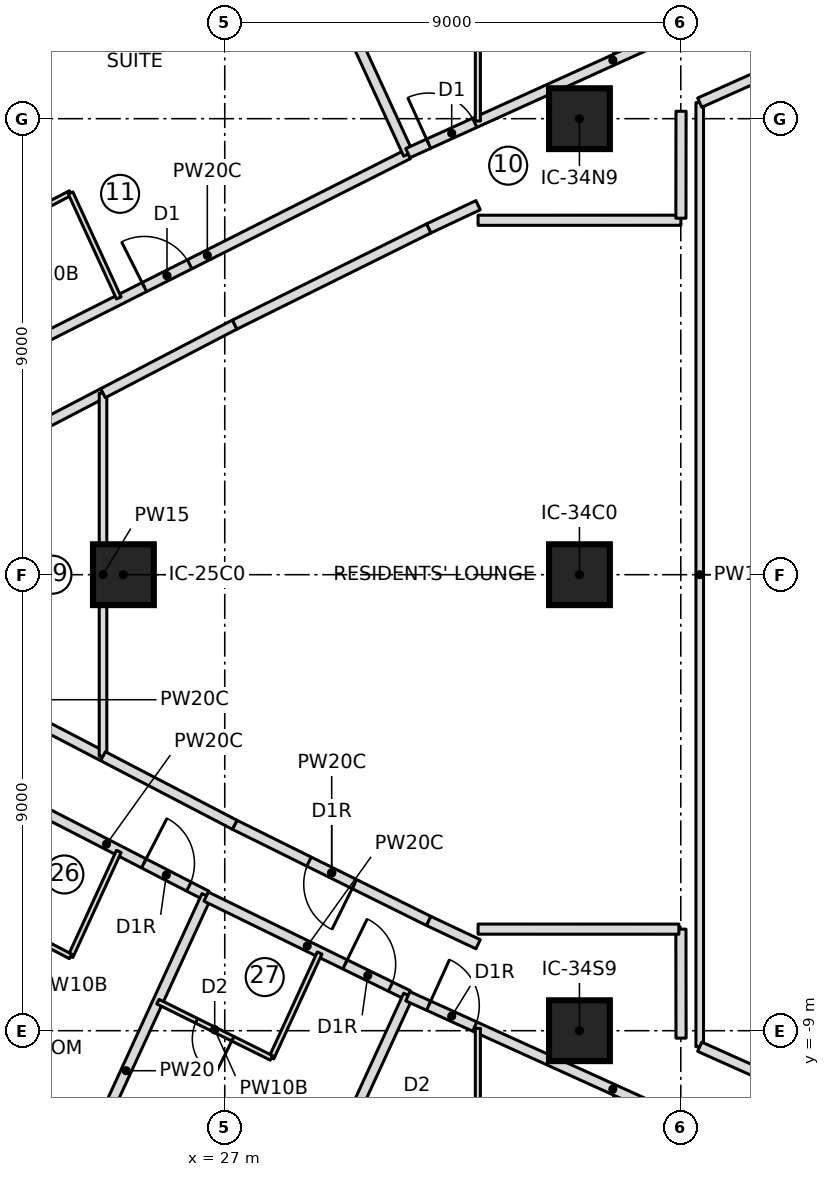
"""IFC4 building model, lengths in metres.
Left out: names, types, materials, properties, quantities, classifications, styles, units other than length and angle.
Written with IfcOpenShell. Run it as: python <this file> out.ifc"""

import sys

from ifc_helpers import new_model, si_unit, direction, frame, frame_2d, origin, origin_2d, place, context, subcontext, project, spatial, rectangle, extrude, element, fill, save


model = new_model("IFC4")
c1 = context("Model", 3, precision=1e-05, world=origin(), true_north=direction((0.0, 1.0)))
c2 = subcontext(c1, "Body", "Model", "MODEL_VIEW")
j1 = project(units=[si_unit("LENGTHUNIT", "METRE"), si_unit("PLANEANGLEUNIT", "RADIAN")], contexts=[c1])
p1 = place(None, origin())
s1 = spatial("IfcSite", under=j1, at=p1, CompositionType="ELEMENT")
p2 = place(p1, origin())
s2 = spatial("IfcBuilding", under=s1, at=p2, CompositionType="ELEMENT")
p3 = place(p2, frame((0.0, 0.0, 95.55)))
s3 = spatial("IfcBuildingStorey", under=s2, at=p3, CompositionType="ELEMENT", Elevation=95.55)
for number, where, z_axis, x_axis in (
    (1, (25.0, 0.0, 0.0), (0.0, 0.0, 1.0), (1.0, 0.0, 0.0)),
    (2, (34.0, -9.0, 0.0), (0.0, 0.0, 1.0), (1.0, 0.0, 0.0)),
    (3, (34.0, 0.0, 0.0), (0.0, 0.0, 1.0), (1.0, 0.0, 0.0)),
    (4, (34.0, 9.0, 0.0), (0.0, 0.0, 1.0), (1.0, 0.0, 0.0)),
):
    element("IfcColumn", number, at=place(p3, frame(where, z_axis=z_axis, x_axis=x_axis)), inside=s3, PredefinedType="COLUMN", context=c2, shape_type="SweptSolid", body=[
        extrude(rectangle(XDim=1.2, YDim=1.2, at=origin_2d()), origin(), (0.0, 0.0, 1.0), 3.55),
    ])
p4 = place(p3, frame((22.69, 4.302, 0.0), z_axis=(0.0, 0.0, 1.0), x_axis=(0.892904919467, 0.450245271815, 0.0)))
e5 = element("IfcWall", 5, at=p4, inside=s3, PredefinedType="PARTITIONING", context=c2, shape_type="SweptSolid", body=[
    extrude(rectangle(XDim=8.883, YDim=0.2, at=frame_2d((4.441, 0.0))), origin(), (0.0, 0.0, 1.0), 3.25),
])
p5 = place(p4, frame((3.05, 0.0, 0.0)))
e6 = element("IfcOpeningElement", 6, at=p5, cuts=e5, PredefinedType="OPENING", context=c2, shape_type="SweptSolid", body=[
    extrude(rectangle(XDim=1.0, YDim=2.1, at=frame_2d((0.5, 1.05))), frame((0.0, 0.11, 0.0), z_axis=(0.0, -1.0, 0.0), x_axis=(1.0, 0.0, 0.0)), (0.0, 0.0, 1.0), 0.22),
])
p6 = place(p3, frame((21.738, 6.377, 0.0), z_axis=(0.0, 0.0, 1.0), x_axis=(0.886911586599, 0.461939214135, 0.0)))
e7 = element("IfcWall", 7, at=p6, inside=s3, PredefinedType="PARTITIONING", context=c2, shape_type="SweptSolid", body=[
    extrude(rectangle(XDim=2.503, YDim=0.1, at=frame_2d((1.251, 0.0))), origin(), (0.0, 0.0, 1.0), 3.25),
])
p7 = place(p6, frame((0.85, 0.0, 0.0)))
e8 = element("IfcOpeningElement", 8, at=p7, cuts=e7, PredefinedType="OPENING", context=c2, shape_type="SweptSolid", body=[
    extrude(rectangle(XDim=0.8, YDim=2.1, at=frame_2d((0.4, 1.05))), frame((0.0, 0.06, 0.0), z_axis=(0.0, -1.0, 0.0), x_axis=(1.0, 0.0, 0.0)), (0.0, 0.0, 1.0), 0.12),
])
p8 = place(p3, frame((23.958, 7.533, 0.0), z_axis=(0.0, 0.0, 1.0), x_axis=(0.417454762401, -0.908697706253, 0.0)))
e9 = element("IfcWall", 9, at=p8, inside=s3, PredefinedType="PARTITIONING", context=c2, shape_type="SweptSolid", body=[
    extrude(rectangle(XDim=2.28, YDim=0.1, at=frame_2d((1.14, 0.0))), origin(), (0.0, 0.0, 1.0), 3.25),
])
p9 = place(p3, frame((30.622, 8.302, 0.0), z_axis=(0.0, 0.0, 1.0), x_axis=(-0.417429919618, 0.90870911859, 0.0)))
e10 = element("IfcWall", 10, at=p9, inside=s3, PredefinedType="PARTITIONING", context=c2, shape_type="SweptSolid", body=[
    extrude(rectangle(XDim=7.6, YDim=0.2, at=frame_2d((3.8, 0.0))), origin(), (0.0, 0.0, 1.0), 3.25),
])
p10 = place(p3, frame((30.614, 8.32, 0.0), z_axis=(0.0, 0.0, 1.0), x_axis=(0.910751030363, 0.41295588226, 0.0)))
e11 = element("IfcWall", 11, at=p10, inside=s3, PredefinedType="PARTITIONING", context=c2, shape_type="SweptSolid", body=[
    extrude(rectangle(XDim=8.883, YDim=0.2, at=frame_2d((4.442, 0.0))), origin(), (0.0, 0.0, 1.0), 3.25),
])
p11 = place(p10, frame((0.45, 0.0, 0.0)))
e12 = element("IfcOpeningElement", 12, at=p11, cuts=e11, PredefinedType="OPENING", context=c2, shape_type="SweptSolid", body=[
    extrude(rectangle(XDim=1.0, YDim=2.1, at=frame_2d((0.5, 1.05))), frame((0.0, 0.11, 0.0), z_axis=(0.0, -1.0, 0.0), x_axis=(1.0, 0.0, 0.0)), (0.0, 0.0, 1.0), 0.22),
])
p12 = place(p3, frame((22.69, -4.302, 0.0), z_axis=(0.0, 0.0, 1.0), x_axis=(0.889236075961, -0.457448577667, 0.0)))
e13 = element("IfcWall", 13, at=p12, inside=s3, PredefinedType="PARTITIONING", context=c2, shape_type="SweptSolid", body=[
    extrude(rectangle(XDim=4.443, YDim=0.2, at=frame_2d((2.222, 0.0))), origin(), (0.0, 0.0, 1.0), 3.25),
])
p13 = place(p12, frame((3.05, 0.0, 0.0)))
e14 = element("IfcOpeningElement", 14, at=p13, cuts=e13, PredefinedType="OPENING", context=c2, shape_type="SweptSolid", body=[
    extrude(rectangle(XDim=1.0, YDim=2.1, at=frame_2d((0.5, 1.05))), frame((0.0, 0.11, 0.0), z_axis=(0.0, -1.0, 0.0), x_axis=(1.0, 0.0, 0.0)), (0.0, 0.0, 1.0), 0.22),
])
p14 = place(p3, frame((24.909, -5.462, 0.0), z_axis=(0.0, 0.0, 1.0), x_axis=(-0.417454762401, -0.908697706253, 0.0)))
e15 = element("IfcWall", 15, at=p14, inside=s3, PredefinedType="PARTITIONING", context=c2, shape_type="SweptSolid", body=[
    extrude(rectangle(XDim=2.28, YDim=0.1, at=frame_2d((1.14, 0.0))), origin(), (0.0, 0.0, 1.0), 3.25),
])
p15 = place(p3, frame((23.958, -7.533, 0.0), z_axis=(0.0, 0.0, 1.0), x_axis=(-0.886911586599, 0.461939214135, 0.0)))
e16 = element("IfcWall", 16, at=p15, inside=s3, PredefinedType="PARTITIONING", context=c2, shape_type="SweptSolid", body=[
    extrude(rectangle(XDim=2.503, YDim=0.1, at=frame_2d((1.251, 0.0))), origin(), (0.0, 0.0, 1.0), 3.25),
])
p16 = place(p15, frame((0.85, 0.0, 0.0)))
e17 = element("IfcOpeningElement", 17, at=p16, cuts=e16, PredefinedType="OPENING", context=c2, shape_type="SweptSolid", body=[
    extrude(rectangle(XDim=0.8, YDim=2.1, at=frame_2d((0.4, 1.05))), frame((0.0, 0.06, 0.0), z_axis=(0.0, -1.0, 0.0), x_axis=(1.0, 0.0, 0.0)), (0.0, 0.0, 1.0), 0.12),
])
p17 = place(p3, frame((23.467, -13.244, 0.0), z_axis=(0.0, 0.0, 1.0), x_axis=(0.417455028008, 0.908697584233, 0.0)))
e18 = element("IfcWall", 18, at=p17, inside=s3, PredefinedType="PARTITIONING", context=c2, shape_type="SweptSolid", body=[
    extrude(rectangle(XDim=7.603, YDim=0.2, at=frame_2d((3.802, 0.0))), origin(), (0.0, 0.0, 1.0), 3.25),
])
p18 = place(p3, frame((26.633, -6.353, 0.0), z_axis=(0.0, 0.0, 1.0), x_axis=(0.898502457097, -0.438968489291, 0.0)))
e19 = element("IfcWall", 19, at=p18, inside=s3, PredefinedType="PARTITIONING", context=c2, shape_type="SweptSolid", body=[
    extrude(rectangle(XDim=4.44, YDim=0.2, at=frame_2d((2.22, 0.0))), origin(), (0.0, 0.0, 1.0), 3.25),
])
p19 = place(p18, frame((3.05, 0.0, 0.0)))
e20 = element("IfcOpeningElement", 20, at=p19, cuts=e19, PredefinedType="OPENING", context=c2, shape_type="SweptSolid", body=[
    extrude(rectangle(XDim=1.0, YDim=2.1, at=frame_2d((0.5, 1.05))), frame((0.0, 0.11, 0.0), z_axis=(0.0, -1.0, 0.0), x_axis=(1.0, 0.0, 0.0)), (0.0, 0.0, 1.0), 0.22),
])
p20 = place(p3, frame((28.873, -7.467, 0.0), z_axis=(0.0, 0.0, 1.0), x_axis=(-0.417433204355, -0.908707609686, 0.0)))
e21 = element("IfcWall", 21, at=p20, inside=s3, PredefinedType="PARTITIONING", context=c2, shape_type="SweptSolid", body=[
    extrude(rectangle(XDim=2.278, YDim=0.1, at=frame_2d((1.139, 0.0))), origin(), (0.0, 0.0, 1.0), 3.25),
])
p21 = place(p3, frame((27.922, -9.537, 0.0), z_axis=(0.0, 0.0, 1.0), x_axis=(-0.895944857815, 0.444165297784, 0.0)))
e22 = element("IfcWall", 22, at=p21, inside=s3, PredefinedType="PARTITIONING", context=c2, shape_type="SweptSolid", body=[
    extrude(rectangle(XDim=2.501, YDim=0.1, at=frame_2d((1.25, 0.0))), origin(), (0.0, 0.0, 1.0), 3.25),
])
p22 = place(p21, frame((0.85, 0.0, 0.0)))
e23 = element("IfcOpeningElement", 23, at=p22, cuts=e22, PredefinedType="OPENING", context=c2, shape_type="SweptSolid", body=[
    extrude(rectangle(XDim=0.8, YDim=2.1, at=frame_2d((0.4, 1.05))), frame((0.0, 0.06, 0.0), z_axis=(0.0, -1.0, 0.0), x_axis=(1.0, 0.0, 0.0)), (0.0, 0.0, 1.0), 0.12),
])
p23 = place(p3, frame((27.449, -15.208, 0.0), z_axis=(0.0, 0.0, 1.0), x_axis=(0.417429919618, 0.90870911859, 0.0)))
e24 = element("IfcWall", 24, at=p23, inside=s3, PredefinedType="PARTITIONING", context=c2, shape_type="SweptSolid", body=[
    extrude(rectangle(XDim=7.6, YDim=0.2, at=frame_2d((3.8, 0.0))), origin(), (0.0, 0.0, 1.0), 3.25),
])
p24 = place(p3, frame((30.614, -8.32, 0.0), z_axis=(0.0, 0.0, 1.0), x_axis=(0.910751030363, -0.41295588226, 0.0)))
e25 = element("IfcWall", 25, at=p24, inside=s3, PredefinedType="PARTITIONING", context=c2, shape_type="SweptSolid", body=[
    extrude(rectangle(XDim=8.883, YDim=0.2, at=frame_2d((4.442, 0.0))), origin(), (0.0, 0.0, 1.0), 3.25),
])
p25 = place(p24, frame((0.45, 0.0, 0.0)))
e26 = element("IfcOpeningElement", 26, at=p25, cuts=e25, PredefinedType="OPENING", context=c2, shape_type="SweptSolid", body=[
    extrude(rectangle(XDim=1.0, YDim=2.1, at=frame_2d((0.5, 1.05))), frame((0.0, 0.11, 0.0), z_axis=(0.0, -1.0, 0.0), x_axis=(1.0, 0.0, 0.0)), (0.0, 0.0, 1.0), 0.22),
])
for number, where, z_axis, x_axis in (
    (27, (23.407, 2.962, 0.0), (0.0, 0.0, 1.0), (0.887, 0.462, 0.0)),
    (28, (24.598, -3.582, 0.0), (0.0, 0.0, 1.0), (-0.887, 0.462, 0.0)),
):
    element("IfcWall", number, at=place(p3, frame(where, z_axis=z_axis, x_axis=x_axis)), inside=s3, PredefinedType="PARTITIONING", context=c2, shape_type="SweptSolid", body=[
        extrude(rectangle(XDim=1.343, YDim=0.2, at=frame_2d((0.671, 0.0))), origin(), (0.0, 0.0, 1.0), 3.25),
    ])
p26 = place(p3, frame((24.598, -3.582, 0.0), z_axis=(0.0, 0.0, 1.0), x_axis=(0.0, 1.0, 0.0)))
e29 = element("IfcWall", 29, at=p26, inside=s3, PredefinedType="PARTITIONING", context=c2, shape_type="SweptSolid", body=[
    extrude(rectangle(XDim=7.165, YDim=0.15, at=frame_2d((3.582, 0.0))), origin(), (0.0, 0.0, 1.0), 3.25),
])
p27 = place(p3, frame((31.025, -6.833, 0.0), z_axis=(0.0, 0.0, 1.0), x_axis=(-0.895975836328, 0.44410280422, 0.0)))
e30 = element("IfcWall", 30, at=p27, inside=s3, PredefinedType="PARTITIONING", context=c2, shape_type="SweptSolid", body=[
    extrude(rectangle(XDim=4.273, YDim=0.2, at=frame_2d((2.137, 0.0))), origin(), (0.0, 0.0, 1.0), 3.25),
])
p28 = place(p27, frame((1.636, 0.0, 0.0)))
e31 = element("IfcOpeningElement", 31, at=p28, cuts=e30, PredefinedType="OPENING", context=c2, shape_type="SweptSolid", body=[
    extrude(rectangle(XDim=1.0, YDim=2.1, at=frame_2d((0.5, 1.05))), frame((0.0, 0.11, 0.0), z_axis=(0.0, -1.0, 0.0), x_axis=(1.0, 0.0, 0.0)), (0.0, 0.0, 1.0), 0.22),
])
for number, where, z_axis, x_axis in (
    (32, (31.025, 6.833, 0.0), (0.0, 0.0, 1.0), (0.905, 0.426, 0.0)),
    (33, (32.0, -7.293, 0.0), (0.0, 0.0, 1.0), (-0.905, 0.426, 0.0)),
):
    element("IfcWall", number, at=place(p3, frame(where, z_axis=z_axis, x_axis=x_axis)), inside=s3, PredefinedType="PARTITIONING", context=c2, shape_type="SweptSolid", body=[
        extrude(rectangle(XDim=1.078, YDim=0.2, at=frame_2d((0.539, 0.0))), origin(), (0.0, 0.0, 1.0), 3.25),
    ])
for number, where, z_axis, x_axis in (
    (34, (27.196, -4.936, 0.0), (0.0, 0.0, 1.0), (-0.887, 0.462, 0.0)),
    (35, (24.598, 3.582, 0.0), (0.0, 0.0, 1.0), (0.887, 0.462, 0.0)),
):
    element("IfcWall", number, at=place(p3, frame(where, z_axis=z_axis, x_axis=x_axis)), inside=s3, PredefinedType="PARTITIONING", context=c2, shape_type="SweptSolid", body=[
        extrude(rectangle(XDim=2.93, YDim=0.2, at=frame_2d((1.465, 0.0))), origin(), (0.0, 0.0, 1.0), 3.25),
    ])
p29 = place(p3, frame((27.196, 4.936, 0.0), z_axis=(0.0, 0.0, 1.0), x_axis=(0.895975836328, 0.44410280422, 0.0)))
e36 = element("IfcWall", 36, at=p29, inside=s3, PredefinedType="PARTITIONING", context=c2, shape_type="SweptSolid", body=[
    extrude(rectangle(XDim=4.273, YDim=0.2, at=frame_2d((2.137, 0.0))), origin(), (0.0, 0.0, 1.0), 3.25),
])
p30 = place(p3, frame((36.374, -9.317, 0.0), z_axis=(0.0, 0.0, 1.0), x_axis=(0.0, 1.0, 0.0)))
e37 = element("IfcWall", 37, at=p30, inside=s3, PredefinedType="PARTITIONING", context=c2, shape_type="SweptSolid", body=[
    extrude(rectangle(XDim=18.634, YDim=0.15, at=frame_2d((9.317, 0.0))), origin(), (0.0, 0.0, 1.0), 3.25),
])
for number, where, z_axis, x_axis in (
    (38, (38.792, -10.397, 0.0), (0.0, 0.0, 1.0), (-0.913, 0.408, 0.0)),
    (39, (36.374, 9.317, 0.0), (0.0, 0.0, 1.0), (0.913, 0.408, 0.0)),
):
    element("IfcWall", number, at=place(p3, frame(where, z_axis=z_axis, x_axis=x_axis)), inside=s3, PredefinedType="PARTITIONING", context=c2, shape_type="SweptSolid", body=[
        extrude(rectangle(XDim=2.648, YDim=0.2, at=frame_2d((1.324, 0.0))), origin(), (0.0, 0.0, 1.0), 3.25),
    ])
for number, where, z_axis, x_axis in (
    (40, (31.995, 11.0, 0.0), (0.0, 0.0, 1.0), (0.0, -1.0, 0.0)),
    (41, (31.995, -8.954, 0.0), (0.0, 0.0, 1.0), (0.0, -1.0, 0.0)),
):
    element("IfcWall", number, at=place(p3, frame(where, z_axis=z_axis, x_axis=x_axis)), inside=s3, PredefinedType="PARTITIONING", context=c2, shape_type="SweptSolid", body=[
        extrude(rectangle(XDim=2.046, YDim=0.1, at=frame_2d((1.023, 0.0))), origin(), (0.0, 0.0, 1.0), 3.25),
    ])
p31 = place(p3, frame((36.005, -9.146, 0.0), z_axis=(0.0, 0.0, 1.0), x_axis=(-0.001135073049, 0.999999355804, 0.0)))
e42 = element("IfcWall", 42, at=p31, inside=s3, PredefinedType="PARTITIONING", context=c2, shape_type="SweptSolid", body=[
    extrude(rectangle(XDim=2.151, YDim=0.2, at=frame_2d((1.075, 0.0))), origin(), (0.0, 0.0, 1.0), 3.25),
])
p32 = place(p3, frame((35.962, -6.996, 0.0), z_axis=(0.0, 0.0, 1.0), x_axis=(-0.999999992409, 0.000123213405, 0.0)))
e43 = element("IfcWall", 43, at=p32, inside=s3, PredefinedType="PARTITIONING", context=c2, shape_type="SweptSolid", body=[
    extrude(rectangle(XDim=3.963, YDim=0.2, at=frame_2d((1.981, 0.0))), origin(), (0.0, 0.0, 1.0), 3.25),
])
p33 = place(p3, frame((32.0, 6.995, 0.0), z_axis=(0.0, 0.0, 1.0), x_axis=(0.99999999256, 0.00012198097, 0.0)))
e44 = element("IfcWall", 44, at=p33, inside=s3, PredefinedType="PARTITIONING", context=c2, shape_type="SweptSolid", body=[
    extrude(rectangle(XDim=4.003, YDim=0.2, at=frame_2d((2.001, 0.0))), origin(), (0.0, 0.0, 1.0), 3.25),
])
p34 = place(p3, frame((36.002, 7.036, 0.0), z_axis=(0.0, 0.0, 1.0), x_axis=(0.001156603436, 0.999999331134, 0.0)))
e45 = element("IfcWall", 45, at=p34, inside=s3, PredefinedType="PARTITIONING", context=c2, shape_type="SweptSolid", body=[
    extrude(rectangle(XDim=2.111, YDim=0.2, at=frame_2d((1.055, 0.0))), origin(), (0.0, 0.0, 1.0), 3.25),
])
p35 = place(p5, origin())
e46 = element("IfcDoor", 46, at=p35, inside=s3, OperationType="SINGLE_SWING_LEFT", PredefinedType="DOOR", context=c2, shape_type="SweptSolid", body=[
    extrude(rectangle(XDim=1.0, YDim=2.1, at=frame_2d((0.5, 1.05))), frame((0.0, 0.025, 0.0), z_axis=(0.0, -1.0, 0.0), x_axis=(1.0, 0.0, 0.0)), (0.0, 0.0, 1.0), 0.05),
])
fill(e6, e46)
p36 = place(p11, origin())
e47 = element("IfcDoor", 47, at=p36, inside=s3, OperationType="SINGLE_SWING_LEFT", PredefinedType="DOOR", context=c2, shape_type="SweptSolid", body=[
    extrude(rectangle(XDim=1.0, YDim=2.1, at=frame_2d((0.5, 1.05))), frame((0.0, 0.025, 0.0), z_axis=(0.0, -1.0, 0.0), x_axis=(1.0, 0.0, 0.0)), (0.0, 0.0, 1.0), 0.05),
])
fill(e12, e47)
p37 = place(p13, origin())
e48 = element("IfcDoor", 48, at=p37, inside=s3, OperationType="SINGLE_SWING_RIGHT", PredefinedType="DOOR", context=c2, shape_type="SweptSolid", body=[
    extrude(rectangle(XDim=1.0, YDim=2.1, at=frame_2d((0.5, 1.05))), frame((0.0, 0.025, 0.0), z_axis=(0.0, -1.0, 0.0), x_axis=(1.0, 0.0, 0.0)), (0.0, 0.0, 1.0), 0.05),
])
fill(e14, e48)
p38 = place(p22, origin())
e49 = element("IfcDoor", 49, at=p38, inside=s3, OperationType="SINGLE_SWING_LEFT", PredefinedType="DOOR", context=c2, shape_type="SweptSolid", body=[
    extrude(rectangle(XDim=0.8, YDim=2.1, at=frame_2d((0.4, 1.05))), frame((0.0, 0.025, 0.0), z_axis=(0.0, -1.0, 0.0), x_axis=(1.0, 0.0, 0.0)), (0.0, 0.0, 1.0), 0.05),
])
fill(e23, e49)
p39 = place(p19, origin())
e50 = element("IfcDoor", 50, at=p39, inside=s3, OperationType="SINGLE_SWING_RIGHT", PredefinedType="DOOR", context=c2, shape_type="SweptSolid", body=[
    extrude(rectangle(XDim=1.0, YDim=2.1, at=frame_2d((0.5, 1.05))), frame((0.0, 0.025, 0.0), z_axis=(0.0, -1.0, 0.0), x_axis=(1.0, 0.0, 0.0)), (0.0, 0.0, 1.0), 0.05),
])
fill(e20, e50)
p40 = place(p25, origin())
e51 = element("IfcDoor", 51, at=p40, inside=s3, OperationType="SINGLE_SWING_RIGHT", PredefinedType="DOOR", context=c2, shape_type="SweptSolid", body=[
    extrude(rectangle(XDim=1.0, YDim=2.1, at=frame_2d((0.5, 1.05))), frame((0.0, 0.025, 0.0), z_axis=(0.0, -1.0, 0.0), x_axis=(1.0, 0.0, 0.0)), (0.0, 0.0, 1.0), 0.05),
])
fill(e26, e51)
p41 = place(p28, origin())
e52 = element("IfcDoor", 52, at=p41, inside=s3, OperationType="SINGLE_SWING_RIGHT", PredefinedType="DOOR", context=c2, shape_type="SweptSolid", body=[
    extrude(rectangle(XDim=1.0, YDim=2.1, at=frame_2d((0.5, 1.05))), frame((0.0, 0.025, 0.0), z_axis=(0.0, -1.0, 0.0), x_axis=(1.0, 0.0, 0.0)), (0.0, 0.0, 1.0), 0.05),
])
fill(e31, e52)
save(model, sys.argv[1])
